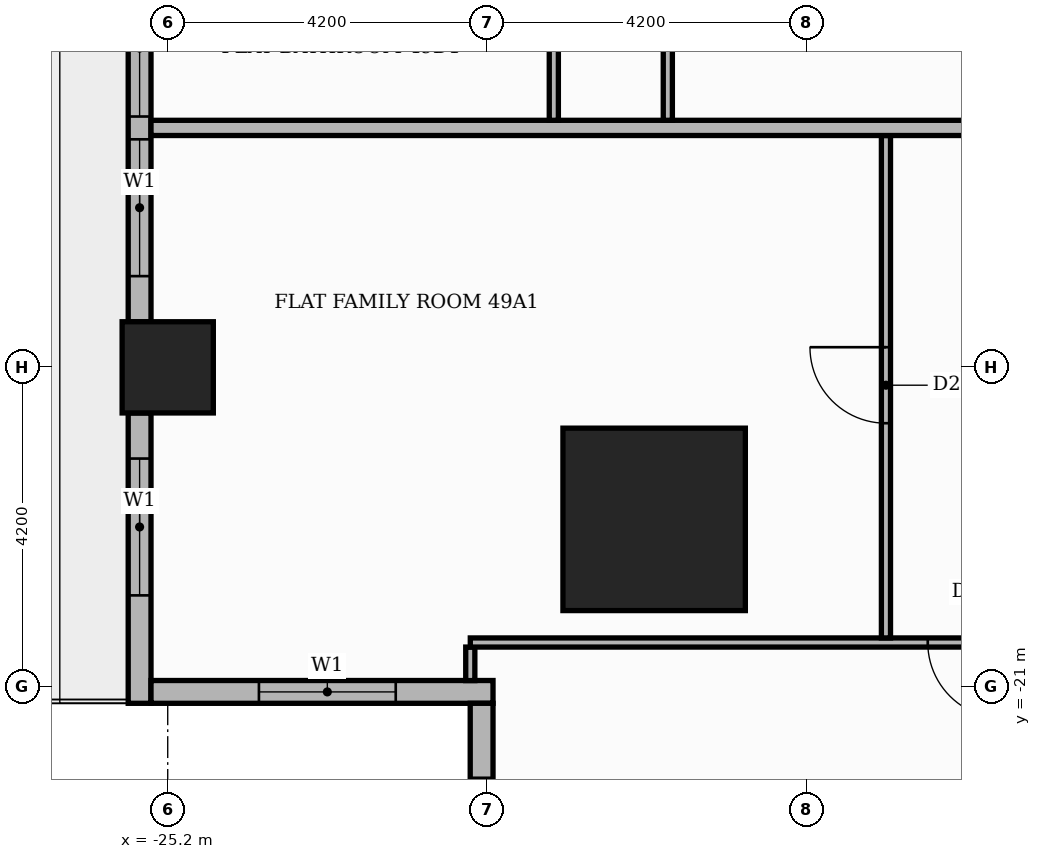
"""IFC4 building model, lengths in metres.
Left out: names, types, materials, properties, quantities, classifications, styles, units other than length and angle.
Written with IfcOpenShell. Run it as: python <this file> out.ifc"""

import sys

from ifc_helpers import new_model, si_unit, direction, frame, frame_2d, origin, origin_2d, place, context, subcontext, project, spatial, rectangle, extrude, element, fill, save


model = new_model("IFC4")
c1 = context("Model", 3, precision=1e-05, world=origin(), true_north=direction((0.0, 1.0)))
c2 = subcontext(c1, "Body", "Model", "MODEL_VIEW")
j1 = project(units=[si_unit("LENGTHUNIT", "METRE"), si_unit("PLANEANGLEUNIT", "RADIAN")], contexts=[c1])
p1 = place(None, origin())
s1 = spatial("IfcSite", under=j1, at=p1, CompositionType="ELEMENT")
p2 = place(p1, origin())
s2 = spatial("IfcBuilding", under=s1, at=p2, CompositionType="ELEMENT")
p3 = place(p2, frame((0.0, 0.0, 207.9)))
s3 = spatial("IfcBuildingStorey", under=s2, at=p3, CompositionType="ELEMENT", Elevation=207.9)
p4 = place(p3, frame((-18.8, -18.8, 0.0), z_axis=(0.0, 0.0, 1.0), x_axis=(1.0, 0.0, 0.0)))
e1 = element("IfcColumn", 1, at=p4, inside=s3, PredefinedType="COLUMN", context=c2, shape_type="SweptSolid", body=[
    extrude(rectangle(XDim=2.4, YDim=2.4, at=origin_2d()), origin(), (0.0, 0.0, 1.0), 3.9),
])
p5 = place(p3, frame((-25.2, -16.8, 0.0), z_axis=(0.0, 0.0, 1.0), x_axis=(1.0, 0.0, 0.0)))
e2 = element("IfcColumn", 2, at=p5, inside=s3, PredefinedType="COLUMN", context=c2, shape_type="SweptSolid", body=[
    extrude(rectangle(XDim=1.2, YDim=1.2, at=origin_2d()), origin(), (0.0, 0.0, 1.0), 3.9),
])
p6 = place(p3, frame((-25.57, -9.0, 0.0), z_axis=(0.0, 0.0, 1.0), x_axis=(0.0, -1.0, 0.0)))
e3 = element("IfcWall", 3, at=p6, inside=s3, PredefinedType="STANDARD", context=c2, shape_type="SweptSolid", body=[
    extrude(rectangle(XDim=7.2, YDim=0.3, at=frame_2d((3.6, 0.0))), origin(), (0.0, 0.0, 1.0), 3.48),
])
p7 = place(p6, frame((0.6, 0.0, 0.9)))
e4 = element("IfcOpeningElement", 4, at=p7, cuts=e3, PredefinedType="OPENING", context=c2, shape_type="SweptSolid", body=[
    extrude(rectangle(XDim=1.8, YDim=2.1, at=frame_2d((0.9, 1.05))), frame((0.0, 0.16, 0.0), z_axis=(0.0, -1.0, 0.0), x_axis=(1.0, 0.0, 0.0)), (0.0, 0.0, 1.0), 0.32),
])
p8 = place(p6, frame((2.7, 0.0, 0.9)))
e5 = element("IfcOpeningElement", 5, at=p8, cuts=e3, PredefinedType="OPENING", context=c2, shape_type="SweptSolid", body=[
    extrude(rectangle(XDim=1.8, YDim=2.1, at=frame_2d((0.9, 1.05))), frame((0.0, 0.16, 0.0), z_axis=(0.0, -1.0, 0.0), x_axis=(1.0, 0.0, 0.0)), (0.0, 0.0, 1.0), 0.32),
])
p9 = place(p6, frame((4.8, 0.0, 0.9)))
e6 = element("IfcOpeningElement", 6, at=p9, cuts=e3, PredefinedType="OPENING", context=c2, shape_type="SweptSolid", body=[
    extrude(rectangle(XDim=1.8, YDim=2.1, at=frame_2d((0.9, 1.05))), frame((0.0, 0.16, 0.0), z_axis=(0.0, -1.0, 0.0), x_axis=(1.0, 0.0, 0.0)), (0.0, 0.0, 1.0), 0.32),
])
p10 = place(p3, frame((-25.57, -17.4, 0.0), z_axis=(0.0, 0.0, 1.0), x_axis=(0.0, -1.0, 0.0)))
e7 = element("IfcWall", 7, at=p10, inside=s3, PredefinedType="STANDARD", context=c2, shape_type="SweptSolid", body=[
    extrude(rectangle(XDim=3.82, YDim=0.3, at=frame_2d((1.91, 0.0))), origin(), (0.0, 0.0, 1.0), 3.48),
])
p11 = place(p10, frame((0.6, 0.0, 0.9)))
e8 = element("IfcOpeningElement", 8, at=p11, cuts=e7, PredefinedType="OPENING", context=c2, shape_type="SweptSolid", body=[
    extrude(rectangle(XDim=1.8, YDim=2.1, at=frame_2d((0.9, 1.05))), frame((0.0, 0.16, 0.0), z_axis=(0.0, -1.0, 0.0), x_axis=(1.0, 0.0, 0.0)), (0.0, 0.0, 1.0), 0.32),
])
p12 = place(p3, frame((-25.42, -21.07, 0.0), z_axis=(0.0, 0.0, 1.0), x_axis=(1.0, 0.0, 0.0)))
e9 = element("IfcWall", 9, at=p12, inside=s3, PredefinedType="STANDARD", context=c2, shape_type="SweptSolid", body=[
    extrude(rectangle(XDim=4.5, YDim=0.3, at=frame_2d((2.25, 0.0))), origin(), (0.0, 0.0, 1.0), 3.48),
])
p13 = place(p12, frame((1.42, 0.0, 0.9)))
e10 = element("IfcOpeningElement", 10, at=p13, cuts=e9, PredefinedType="OPENING", context=c2, shape_type="SweptSolid", body=[
    extrude(rectangle(XDim=1.8, YDim=2.1, at=frame_2d((0.9, 1.05))), frame((0.0, 0.16, 0.0), z_axis=(0.0, -1.0, 0.0), x_axis=(1.0, 0.0, 0.0)), (0.0, 0.0, 1.0), 0.32),
])
p14 = place(p3, frame((-21.07, -21.22, 0.0), z_axis=(0.0, 0.0, 1.0), x_axis=(0.0, -1.0, 0.0)))
e11 = element("IfcWall", 11, at=p14, inside=s3, PredefinedType="STANDARD", context=c2, shape_type="SweptSolid", body=[
    extrude(rectangle(XDim=4.5, YDim=0.3, at=frame_2d((2.25, 0.0))), origin(), (0.0, 0.0, 1.0), 3.48),
])
p15 = place(p14, frame((0.98, 0.0, 0.9)))
e12 = element("IfcOpeningElement", 12, at=p15, cuts=e11, PredefinedType="OPENING", context=c2, shape_type="SweptSolid", body=[
    extrude(rectangle(XDim=1.8, YDim=2.1, at=frame_2d((0.9, 1.05))), frame((0.0, 0.16, 0.0), z_axis=(0.0, -1.0, 0.0), x_axis=(1.0, 0.0, 0.0)), (0.0, 0.0, 1.0), 0.32),
])
p16 = place(p3, frame((-21.219, -20.921, 0.0), z_axis=(0.0, 0.0, 1.0), x_axis=(0.0, 1.0, 0.0)))
e13 = element("IfcWall", 13, at=p16, inside=s3, PredefinedType="PARTITIONING", context=c2, shape_type="SweptSolid", body=[
    extrude(rectangle(XDim=0.441, YDim=0.12, at=frame_2d((0.22, 0.0))), origin(), (0.0, 0.0, 1.0), 3.48),
])
p17 = place(p3, frame((-21.219, -20.42, 0.0), z_axis=(0.0, 0.0, 1.0), x_axis=(1.0, 0.0, 0.0)))
e14 = element("IfcWall", 14, at=p17, inside=s3, PredefinedType="PARTITIONING", context=c2, shape_type="SweptSolid", body=[
    extrude(rectangle(XDim=15.869, YDim=0.12, at=frame_2d((7.935, 0.0))), origin(), (0.0, 0.0, 1.0), 3.48),
])
p18 = place(p17, frame((6.019, 0.0, 0.0)))
e15 = element("IfcOpeningElement", 15, at=p18, cuts=e14, PredefinedType="OPENING", context=c2, shape_type="SweptSolid", body=[
    extrude(rectangle(XDim=1.0, YDim=2.1, at=frame_2d((0.5, 1.05))), frame((0.0, 0.07, 0.0), z_axis=(0.0, -1.0, 0.0), x_axis=(1.0, 0.0, 0.0)), (0.0, 0.0, 1.0), 0.14),
])
p19 = place(p17, frame((9.219, 0.0, 0.0)))
e16 = element("IfcOpeningElement", 16, at=p19, cuts=e14, PredefinedType="OPENING", context=c2, shape_type="SweptSolid", body=[
    extrude(rectangle(XDim=0.9, YDim=2.1, at=frame_2d((0.45, 1.05))), frame((0.0, 0.07, 0.0), z_axis=(0.0, -1.0, 0.0), x_axis=(1.0, 0.0, 0.0)), (0.0, 0.0, 1.0), 0.14),
])
p20 = place(p3, frame((-15.75, -20.36, 0.0), z_axis=(0.0, 0.0, 1.0), x_axis=(0.0, 1.0, 0.0)))
e17 = element("IfcWall", 17, at=p20, inside=s3, PredefinedType="PARTITIONING", context=c2, shape_type="SweptSolid", body=[
    extrude(rectangle(XDim=6.61, YDim=0.12, at=frame_2d((3.305, 0.0))), origin(), (0.0, 0.0, 1.0), 3.48),
])
p21 = place(p20, frame((2.825, 0.0, 0.0)))
e18 = element("IfcOpeningElement", 18, at=p21, cuts=e17, PredefinedType="OPENING", context=c2, shape_type="SweptSolid", body=[
    extrude(rectangle(XDim=1.0, YDim=2.1, at=frame_2d((0.5, 1.05))), frame((0.0, 0.07, 0.0), z_axis=(0.0, -1.0, 0.0), x_axis=(1.0, 0.0, 0.0)), (0.0, 0.0, 1.0), 0.14),
])
p22 = place(p3, frame((-25.42, -13.65, 0.0), z_axis=(0.0, 0.0, 1.0), x_axis=(1.0, 0.0, 0.0)))
e19 = element("IfcWall", 19, at=p22, inside=s3, PredefinedType="PARTITIONING", context=c2, shape_type="SweptSolid", body=[
    extrude(rectangle(XDim=39.07, YDim=0.2, at=frame_2d((19.535, 0.0))), origin(), (0.0, 0.0, 1.0), 3.48),
])
p23 = place(p22, frame((13.32, 0.0, 0.0)))
e20 = element("IfcOpeningElement", 20, at=p23, cuts=e19, PredefinedType="OPENING", context=c2, shape_type="SweptSolid", body=[
    extrude(rectangle(XDim=1.1, YDim=2.4, at=frame_2d((0.55, 1.2))), frame((0.0, 0.11, 0.0), z_axis=(0.0, -1.0, 0.0), x_axis=(1.0, 0.0, 0.0)), (0.0, 0.0, 1.0), 0.22),
])
p24 = place(p22, frame((23.82, 0.0, 0.0)))
e21 = element("IfcOpeningElement", 21, at=p24, cuts=e19, PredefinedType="OPENING", context=c2, shape_type="SweptSolid", body=[
    extrude(rectangle(XDim=1.1, YDim=2.4, at=frame_2d((0.55, 1.2))), frame((0.0, 0.11, 0.0), z_axis=(0.0, -1.0, 0.0), x_axis=(1.0, 0.0, 0.0)), (0.0, 0.0, 1.0), 0.22),
])
p25 = place(p3, frame((-20.12, -13.55, 0.0), z_axis=(0.0, 0.0, 1.0), x_axis=(0.0, 1.0, 0.0)))
e22 = element("IfcWall", 22, at=p25, inside=s3, PredefinedType="PARTITIONING", context=c2, shape_type="SweptSolid", body=[
    extrude(rectangle(XDim=1.94, YDim=0.12, at=frame_2d((0.97, 0.0))), origin(), (0.0, 0.0, 1.0), 3.48),
])
p26 = place(p3, frame((-18.62, -13.55, 0.0), z_axis=(0.0, 0.0, 1.0), x_axis=(0.0, 1.0, 0.0)))
e23 = element("IfcWall", 23, at=p26, inside=s3, PredefinedType="PARTITIONING", context=c2, shape_type="SweptSolid", body=[
    extrude(rectangle(XDim=3.59, YDim=0.12, at=frame_2d((1.795, 0.0))), origin(), (0.0, 0.0, 1.0), 3.48),
])
p27 = place(p26, frame((1.325, 0.0, 0.0)))
e24 = element("IfcOpeningElement", 24, at=p27, cuts=e23, PredefinedType="OPENING", context=c2, shape_type="SweptSolid", body=[
    extrude(rectangle(XDim=0.9, YDim=2.1, at=frame_2d((0.45, 1.05))), frame((0.0, 0.07, 0.0), z_axis=(0.0, -1.0, 0.0), x_axis=(1.0, 0.0, 0.0)), (0.0, 0.0, 1.0), 0.14),
])
p28 = place(p8, origin())
e25 = element("IfcWindow", 25, at=p28, inside=s3, PartitioningType="SINGLE_PANEL", PredefinedType="WINDOW", context=c2, shape_type="SweptSolid", body=[
    extrude(rectangle(XDim=1.8, YDim=2.1, at=frame_2d((0.9, 1.05))), frame((0.0, 0.03, 0.0), z_axis=(0.0, -1.0, 0.0), x_axis=(1.0, 0.0, 0.0)), (0.0, 0.0, 1.0), 0.06),
])
fill(e5, e25)
p29 = place(p9, origin())
e26 = element("IfcWindow", 26, at=p29, inside=s3, PartitioningType="SINGLE_PANEL", PredefinedType="WINDOW", context=c2, shape_type="SweptSolid", body=[
    extrude(rectangle(XDim=1.8, YDim=2.1, at=frame_2d((0.9, 1.05))), frame((0.0, 0.03, 0.0), z_axis=(0.0, -1.0, 0.0), x_axis=(1.0, 0.0, 0.0)), (0.0, 0.0, 1.0), 0.06),
])
fill(e6, e26)
p30 = place(p11, origin())
e27 = element("IfcWindow", 27, at=p30, inside=s3, PartitioningType="SINGLE_PANEL", PredefinedType="WINDOW", context=c2, shape_type="SweptSolid", body=[
    extrude(rectangle(XDim=1.8, YDim=2.1, at=frame_2d((0.9, 1.05))), frame((0.0, 0.03, 0.0), z_axis=(0.0, -1.0, 0.0), x_axis=(1.0, 0.0, 0.0)), (0.0, 0.0, 1.0), 0.06),
])
fill(e8, e27)
p31 = place(p13, origin())
e28 = element("IfcWindow", 28, at=p31, inside=s3, PartitioningType="SINGLE_PANEL", PredefinedType="WINDOW", context=c2, shape_type="SweptSolid", body=[
    extrude(rectangle(XDim=1.8, YDim=2.1, at=frame_2d((0.9, 1.05))), frame((0.0, 0.03, 0.0), z_axis=(0.0, -1.0, 0.0), x_axis=(1.0, 0.0, 0.0)), (0.0, 0.0, 1.0), 0.06),
])
fill(e10, e28)
p32 = place(p15, origin())
e29 = element("IfcWindow", 29, at=p32, inside=s3, PartitioningType="SINGLE_PANEL", PredefinedType="WINDOW", context=c2, shape_type="SweptSolid", body=[
    extrude(rectangle(XDim=1.8, YDim=2.1, at=frame_2d((0.9, 1.05))), frame((0.0, 0.03, 0.0), z_axis=(0.0, -1.0, 0.0), x_axis=(1.0, 0.0, 0.0)), (0.0, 0.0, 1.0), 0.06),
])
fill(e12, e29)
p33 = place(p21, origin())
e30 = element("IfcDoor", 30, at=p33, inside=s3, OperationType="SINGLE_SWING_RIGHT", PredefinedType="DOOR", context=c2, shape_type="SweptSolid", body=[
    extrude(rectangle(XDim=1.0, YDim=2.1, at=frame_2d((0.5, 1.05))), frame((0.0, 0.025, 0.0), z_axis=(0.0, -1.0, 0.0), x_axis=(1.0, 0.0, 0.0)), (0.0, 0.0, 1.0), 0.05),
])
fill(e18, e30)
p34 = place(p18, frame((1.0, 0.0, 0.0), z_axis=(0.0, 0.0, 1.0), x_axis=(-1.0, 0.0, 0.0)))
e31 = element("IfcDoor", 31, at=p34, inside=s3, OperationType="SINGLE_SWING_RIGHT", PredefinedType="DOOR", context=c2, shape_type="SweptSolid", body=[
    extrude(rectangle(XDim=1.0, YDim=2.1, at=frame_2d((0.5, 1.05))), frame((0.0, 0.025, 0.0), z_axis=(0.0, -1.0, 0.0), x_axis=(1.0, 0.0, 0.0)), (0.0, 0.0, 1.0), 0.05),
])
fill(e15, e31)
save(model, sys.argv[1])
